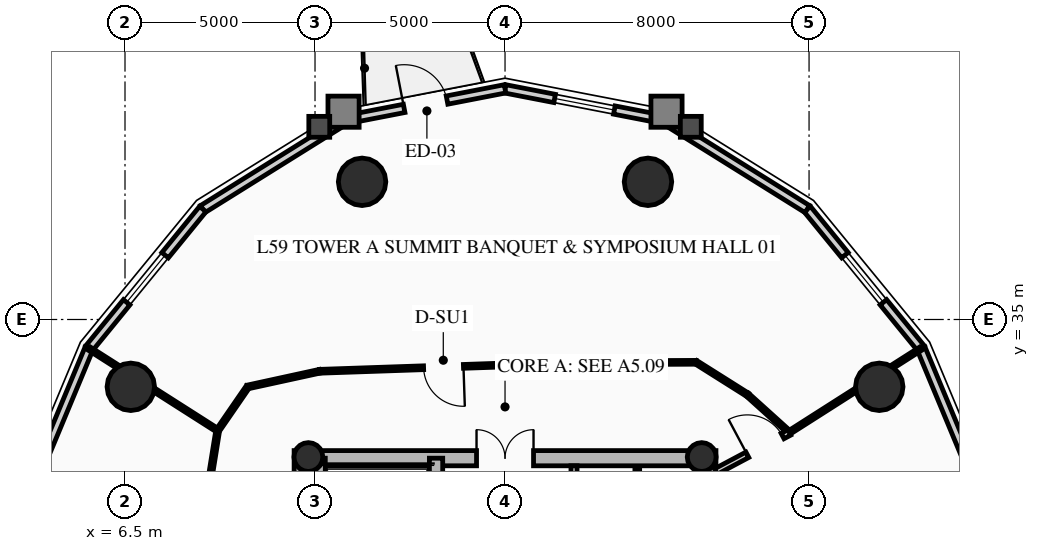
"""IFC4 building model, lengths in metres.
Left out: names, types, materials, properties, quantities, classifications, styles, units other than length and angle.
Written with IfcOpenShell. Run it as: python <this file> out.ifc"""

import sys

from ifc_helpers import new_model, si_unit, direction, frame, frame_2d, origin, origin_2d, place, context, subcontext, project, spatial, rectangle, circle, hollow_circle, extrude, source, transform, mapped, element, fill, save


model = new_model("IFC4")
c1 = context("Model", 3, precision=1e-05, world=origin(), true_north=direction((0.0, 1.0)))
c2 = subcontext(c1, "Body", "Model", "MODEL_VIEW")
j1 = project(units=[si_unit("LENGTHUNIT", "METRE"), si_unit("PLANEANGLEUNIT", "RADIAN")], contexts=[c1])
p1 = place(None, origin())
s1 = spatial("IfcSite", under=j1, at=p1, CompositionType="ELEMENT")
p2 = place(p1, origin())
s2 = spatial("IfcBuilding", under=s1, at=p2, CompositionType="ELEMENT")
p3 = place(p2, frame((0.0, 0.0, 186.52)))
s3 = spatial("IfcBuildingStorey", under=s2, at=p3, CompositionType="ELEMENT", Elevation=186.52)
for number, where, z_axis, x_axis in (
    (1, (11.15, 17.45, 0.0), (0.0, 0.0, 1.0), (0.0, 1.0, 0.0)),
    (2, (21.85, 17.45, 0.0), (0.0, 0.0, 1.0), (0.0, 1.0, 0.0)),
):
    element("IfcWall", number, at=place(p3, frame(where, z_axis=z_axis, x_axis=x_axis)), inside=s3, PredefinedType="SHEAR", context=c2, shape_type="SweptSolid", body=[
        extrude(rectangle(XDim=14.1, YDim=0.4, at=frame_2d((7.05, 0.0))), origin(), (0.0, 0.0, 1.0), 2.91),
    ])
p4 = place(p3, frame((11.15, 31.35, 0.0), z_axis=(0.0, 0.0, 1.0), x_axis=(1.0, 0.0, 0.0)))
e3 = element("IfcWall", 3, at=p4, inside=s3, PredefinedType="SHEAR", context=c2, shape_type="SweptSolid", body=[
    extrude(rectangle(XDim=10.7, YDim=0.4, at=frame_2d((5.35, 0.0))), origin(), (0.0, 0.0, 1.0), 2.91),
])
m1 = source(origin(), c2, "Body", "SweptSolid", [
    extrude(rectangle(XDim=1.5, YDim=2.02, at=frame_2d((0.75, 1.01))), frame((0.0, 0.21, 0.0), z_axis=(0.0, -1.0, 0.0), x_axis=(1.0, 0.0, 0.0)), (0.0, 0.0, 1.0), 0.42),
])
p5 = place(p4, frame((4.6, 0.0, 0.0)))
e4 = element("IfcOpeningElement", 4, at=p5, cuts=e3, PredefinedType="OPENING", context=c2, shape_type="MappedRepresentation", body=[
    mapped(m1, transform((0.0, 0.0, 0.0), x_axis=(1.0, 0.0, 0.0), y_axis=(0.0, 1.0, 0.0), z_axis=(0.0, 0.0, 1.0), scale=1.0)),
])
p6 = place(p3, frame((14.685, 17.65, 0.0), z_axis=(0.0, 0.0, 1.0), x_axis=(0.0, 1.0, 0.0)))
e5 = element("IfcWall", 5, at=p6, inside=s3, PredefinedType="SHEAR", context=c2, shape_type="SweptSolid", body=[
    extrude(rectangle(XDim=13.7, YDim=0.35, at=frame_2d((6.85, 0.0))), origin(), (0.0, 0.0, 1.0), 2.91),
])
m2 = source(origin(), c2, "Body", "SweptSolid", [
    extrude(rectangle(XDim=1.1, YDim=2.015, at=frame_2d((0.55, 1.007))), frame((0.0, 0.185, 0.0), z_axis=(0.0, -1.0, 0.0), x_axis=(1.0, 0.0, 0.0)), (0.0, 0.0, 1.0), 0.37),
])
p7 = place(p6, frame((4.85, 0.0, 0.0)))
e6 = element("IfcOpeningElement", 6, at=p7, cuts=e5, PredefinedType="OPENING", context=c2, shape_type="MappedRepresentation", body=[
    mapped(m2, transform((0.0, 0.0, 0.0), x_axis=(1.0, 0.0, 0.0), y_axis=(0.0, 1.0, 0.0), z_axis=(0.0, 0.0, 1.0), scale=1.0)),
])
p8 = place(p6, frame((0.625, 0.0, 0.0)))
e7 = element("IfcOpeningElement", 7, at=p8, cuts=e5, PredefinedType="OPENING", context=c2, shape_type="MappedRepresentation", body=[
    mapped(m2, transform((0.0, 0.0, 0.0), x_axis=(1.0, 0.0, 0.0), y_axis=(0.0, 1.0, 0.0), z_axis=(0.0, 0.0, 1.0), scale=1.0)),
])
p9 = place(p6, frame((2.625, 0.0, 0.0)))
e8 = element("IfcOpeningElement", 8, at=p9, cuts=e5, PredefinedType="OPENING", context=c2, shape_type="MappedRepresentation", body=[
    mapped(m2, transform((0.0, 0.0, 0.0), x_axis=(1.0, 0.0, 0.0), y_axis=(0.0, 1.0, 0.0), z_axis=(0.0, 0.0, 1.0), scale=1.0)),
])
m3 = source(origin(), c2, "Body", "SweptSolid", [
    extrude(rectangle(XDim=1.15, YDim=2.02, at=frame_2d((0.575, 1.01))), frame((0.0, 0.185, 0.0), z_axis=(0.0, -1.0, 0.0), x_axis=(1.0, 0.0, 0.0)), (0.0, 0.0, 1.0), 0.37),
])
p10 = place(p6, frame((7.27, 0.0, 0.0)))
e9 = element("IfcOpeningElement", 9, at=p10, cuts=e5, PredefinedType="OPENING", context=c2, shape_type="MappedRepresentation", body=[
    mapped(m3, transform((0.0, 0.0, 0.0), x_axis=(1.0, 0.0, 0.0), y_axis=(0.0, 1.0, 0.0), z_axis=(0.0, 0.0, 1.0), scale=1.0)),
])
p11 = place(p3, frame((11.595, 24.655, 0.0), z_axis=(0.0, 0.0, 1.0), x_axis=(0.0, 1.0, 0.0)))
e10 = element("IfcWall", 10, at=p11, inside=s3, PredefinedType="SHEAR", context=c2, shape_type="SweptSolid", body=[
    extrude(rectangle(XDim=6.695, YDim=0.35, at=frame_2d((3.348, 0.0))), origin(), (0.0, 0.0, 1.0), 2.91),
])
for number, where, z_axis, x_axis in (
    (11, (11.325, 31.38, 0.0), (0.0, 0.0, 1.0), (1.0, 0.0, 0.0)),
    (12, (21.675, 31.38, 0.0), (0.0, 0.0, 1.0), (1.0, 0.0, 0.0)),
):
    element("IfcColumn", number, at=place(p3, frame(where, z_axis=z_axis, x_axis=x_axis)), inside=s3, PredefinedType="COLUMN", context=c2, shape_type="SweptSolid", body=[
        extrude(hollow_circle(Radius=0.38, WallThickness=0.032, at=origin_2d()), origin(), (0.0, 0.0, 1.0), 2.91),
    ])
for number, where, z_axis, x_axis in (
    (13, (26.347, 33.229, 0.0), (0.0, 0.0, 1.0), (1.0, 0.0, 0.0)),
    (14, (20.261, 38.623, 0.0), (0.0, 0.0, 1.0), (1.0, 0.0, 0.0)),
    (15, (12.739, 38.623, 0.0), (0.0, 0.0, 1.0), (1.0, 0.0, 0.0)),
    (16, (6.653, 33.229, 0.0), (0.0, 0.0, 1.0), (1.0, 0.0, 0.0)),
):
    element("IfcColumn", number, at=place(p3, frame(where, z_axis=z_axis, x_axis=x_axis)), inside=s3, PredefinedType="USERDEFINED", context=c2, shape_type="SweptSolid", body=[
        extrude(circle(Radius=0.625, at=origin_2d()), origin(), (0.0, 0.0, 1.0), 2.91),
    ])
p12 = place(p3, frame((27.447, 34.24, 0.0), z_axis=(0.0, 0.0, 1.0), x_axis=(0.384144094086, -0.923273152961, 0.0)))
e17 = element("IfcWall", 17, at=p12, inside=s3, PredefinedType="SOLIDWALL", context=c2, shape_type="SweptSolid", body=[
    extrude(rectangle(XDim=5.003, YDim=0.22, at=frame_2d((2.501, 0.0))), origin(), (0.0, 0.0, 1.0), 2.245),
])
p13 = place(p3, frame((24.453, 37.906, 0.0), z_axis=(0.0, 0.0, 1.0), x_axis=(0.632470615287, -0.774584353572, 0.0)))
e18 = element("IfcWall", 18, at=p13, inside=s3, PredefinedType="SOLIDWALL", context=c2, shape_type="SweptSolid", body=[
    extrude(rectangle(XDim=4.733, YDim=0.22, at=frame_2d((2.366, 0.0))), origin(), (0.0, 0.0, 1.0), 2.245),
])
m4 = source(origin(), c2, "Body", "SweptSolid", [
    extrude(rectangle(XDim=1.6, YDim=1.3, at=frame_2d((0.8, 0.65))), frame((0.0, 0.12, 0.0), z_axis=(0.0, -1.0, 0.0), x_axis=(1.0, 0.0, 0.0)), (0.0, 0.0, 1.0), 0.24),
])
p14 = place(p13, frame((1.566, 0.0, 0.65)))
e19 = element("IfcOpeningElement", 19, at=p14, cuts=e18, PredefinedType="OPENING", context=c2, shape_type="MappedRepresentation", body=[
    mapped(m4, transform((0.0, 0.0, 0.0), x_axis=(1.0, 0.0, 0.0), y_axis=(0.0, 1.0, 0.0), z_axis=(0.0, 0.0, 1.0), scale=1.0)),
])
p15 = place(p3, frame((20.681, 40.259, 0.0), z_axis=(0.0, 0.0, 1.0), x_axis=(0.848399108042, -0.529357113368, 0.0)))
e20 = element("IfcWall", 20, at=p15, inside=s3, PredefinedType="SOLIDWALL", context=c2, shape_type="SweptSolid", body=[
    extrude(rectangle(XDim=4.446, YDim=0.22, at=frame_2d((2.223, 0.0))), origin(), (0.0, 0.0, 1.0), 2.245),
])
p16 = place(p3, frame((16.5, 41.07, 0.0), z_axis=(0.0, 0.0, 1.0), x_axis=(0.981703883443, -0.190413983815, 0.0)))
e21 = element("IfcWall", 21, at=p16, inside=s3, PredefinedType="SOLIDWALL", context=c2, shape_type="SweptSolid", body=[
    extrude(rectangle(XDim=4.259, YDim=0.22, at=frame_2d((2.13, 0.0))), origin(), (0.0, 0.0, 1.0), 2.245),
])
p17 = place(p16, frame((1.33, 0.0, 0.65)))
e22 = element("IfcOpeningElement", 22, at=p17, cuts=e21, PredefinedType="OPENING", context=c2, shape_type="MappedRepresentation", body=[
    mapped(m4, transform((0.0, 0.0, 0.0), x_axis=(1.0, 0.0, 0.0), y_axis=(0.0, 1.0, 0.0), z_axis=(0.0, 0.0, 1.0), scale=1.0)),
])
p18 = place(p3, frame((12.319, 40.259, 0.0), z_axis=(0.0, 0.0, 1.0), x_axis=(0.981703883443, 0.190413983815, 0.0)))
e23 = element("IfcWall", 23, at=p18, inside=s3, PredefinedType="SOLIDWALL", context=c2, shape_type="SweptSolid", body=[
    extrude(rectangle(XDim=4.259, YDim=0.22, at=frame_2d((2.13, 0.0))), origin(), (0.0, 0.0, 1.0), 2.245),
])
m5 = source(origin(), c2, "Body", "SweptSolid", [
    extrude(rectangle(XDim=1.15, YDim=2.005, at=frame_2d((0.575, 1.002))), frame((0.0, 0.12, 0.0), z_axis=(0.0, -1.0, 0.0), x_axis=(1.0, 0.0, 0.0)), (0.0, 0.0, 1.0), 0.24),
])
p19 = place(p18, frame((1.555, 0.0, 0.0)))
e24 = element("IfcOpeningElement", 24, at=p19, cuts=e23, PredefinedType="OPENING", context=c2, shape_type="MappedRepresentation", body=[
    mapped(m5, transform((0.0, 0.0, 0.0), x_axis=(1.0, 0.0, 0.0), y_axis=(0.0, 1.0, 0.0), z_axis=(0.0, 0.0, 1.0), scale=1.0)),
])
p20 = place(p3, frame((8.547, 37.906, 0.0), z_axis=(0.0, 0.0, 1.0), x_axis=(0.848399108042, 0.529357113368, 0.0)))
e25 = element("IfcWall", 25, at=p20, inside=s3, PredefinedType="SOLIDWALL", context=c2, shape_type="SweptSolid", body=[
    extrude(rectangle(XDim=4.446, YDim=0.22, at=frame_2d((2.223, 0.0))), origin(), (0.0, 0.0, 1.0), 2.245),
])
p21 = place(p3, frame((5.553, 34.24, 0.0), z_axis=(0.0, 0.0, 1.0), x_axis=(0.632470615287, 0.774584353572, 0.0)))
e26 = element("IfcWall", 26, at=p21, inside=s3, PredefinedType="SOLIDWALL", context=c2, shape_type="SweptSolid", body=[
    extrude(rectangle(XDim=4.733, YDim=0.22, at=frame_2d((2.366, 0.0))), origin(), (0.0, 0.0, 1.0), 2.245),
])
p22 = place(p21, frame((1.566, 0.0, 0.65)))
e27 = element("IfcOpeningElement", 27, at=p22, cuts=e26, PredefinedType="OPENING", context=c2, shape_type="MappedRepresentation", body=[
    mapped(m4, transform((0.0, 0.0, 0.0), x_axis=(1.0, 0.0, 0.0), y_axis=(0.0, 1.0, 0.0), z_axis=(0.0, 0.0, 1.0), scale=1.0)),
])
p23 = place(p3, frame((3.631, 29.62, 0.0), z_axis=(0.0, 0.0, 1.0), x_axis=(0.384144094086, 0.923273152961, 0.0)))
e28 = element("IfcWall", 28, at=p23, inside=s3, PredefinedType="SOLIDWALL", context=c2, shape_type="SweptSolid", body=[
    extrude(rectangle(XDim=5.003, YDim=0.22, at=frame_2d((2.501, 0.0))), origin(), (0.0, 0.0, 1.0), 2.245),
])
p24 = place(p3, frame((18.315, 27.25, 0.0), z_axis=(0.0, 0.0, 1.0), x_axis=(0.0, 1.0, 0.0)))
e29 = element("IfcWall", 29, at=p24, inside=s3, PredefinedType="PARTITIONING", context=c2, shape_type="SweptSolid", body=[
    extrude(rectangle(XDim=3.9, YDim=0.16, at=frame_2d((1.95, 0.0))), origin(), (0.0, 0.0, 1.0), 2.675),
])
m6 = source(origin(), c2, "Body", "SweptSolid", [
    extrude(rectangle(XDim=0.9, YDim=2.005, at=frame_2d((0.45, 1.002))), frame((0.0, 0.09, 0.0), z_axis=(0.0, -1.0, 0.0), x_axis=(1.0, 0.0, 0.0)), (0.0, 0.0, 1.0), 0.18),
])
p25 = place(p24, frame((2.2, 0.0, 0.0)))
e30 = element("IfcOpeningElement", 30, at=p25, cuts=e29, PredefinedType="OPENING", context=c2, shape_type="MappedRepresentation", body=[
    mapped(m6, transform((0.0, 0.0, 0.0), x_axis=(1.0, 0.0, 0.0), y_axis=(0.0, 1.0, 0.0), z_axis=(0.0, 0.0, 1.0), scale=1.0)),
])
p26 = place(p3, frame((19.98, 27.3, 0.0), z_axis=(0.0, 0.0, 1.0), x_axis=(0.0, 1.0, 0.0)))
e31 = element("IfcWall", 31, at=p26, inside=s3, PredefinedType="PARTITIONING", context=c2, shape_type="SweptSolid", body=[
    extrude(rectangle(XDim=3.82, YDim=0.125, at=frame_2d((1.91, 0.0))), origin(), (0.0, 0.0, 1.0), 2.675),
])
m7 = source(origin(), c2, "Body", "SweptSolid", [
    extrude(rectangle(XDim=0.9, YDim=2.005, at=frame_2d((0.45, 1.002))), frame((0.0, 0.073, 0.0), z_axis=(0.0, -1.0, 0.0), x_axis=(1.0, 0.0, 0.0)), (0.0, 0.0, 1.0), 0.145),
])
p27 = place(p26, frame((1.45, 0.0, 0.0)))
e32 = element("IfcOpeningElement", 32, at=p27, cuts=e31, PredefinedType="OPENING", context=c2, shape_type="MappedRepresentation", body=[
    mapped(m7, transform((0.0, 0.0, 0.0), x_axis=(1.0, 0.0, 0.0), y_axis=(0.0, 1.0, 0.0), z_axis=(0.0, 0.0, 1.0), scale=1.0)),
])
p28 = place(p3, frame((23.98, 32.027, 0.0), z_axis=(0.0, 0.0, 1.0), x_axis=(-0.742353224332, 0.670008724065, 0.0)))
e33 = element("IfcWall", 33, at=p28, inside=s3, PredefinedType="MOVABLE", context=c2, shape_type="SweptSolid", body=[
    extrude(rectangle(XDim=1.485, YDim=0.1, at=frame_2d((0.742, 0.0))), origin(), (0.0, 0.0, 1.0), 2.245),
])
p29 = place(p3, frame((22.877, 33.022, 0.0), z_axis=(0.0, 0.0, 1.0), x_axis=(-0.845895608855, 0.533348496689, 0.0)))
e34 = element("IfcWall", 34, at=p29, inside=s3, PredefinedType="MOVABLE", context=c2, shape_type="SweptSolid", body=[
    extrude(rectangle(XDim=1.597, YDim=0.1, at=frame_2d((0.798, 0.0))), origin(), (0.0, 0.0, 1.0), 2.245),
])
p30 = place(p3, frame((21.527, 33.873, 0.0), z_axis=(0.0, 0.0, 1.0), x_axis=(-0.999991838845, -0.004040079574, 0.0)))
e35 = element("IfcWall", 35, at=p30, inside=s3, PredefinedType="MOVABLE", context=c2, shape_type="SweptSolid", body=[
    extrude(rectangle(XDim=3.384, YDim=0.1, at=frame_2d((1.692, 0.0))), origin(), (0.0, 0.0, 1.0), 2.245),
])
p31 = place(p3, frame((18.143, 33.86, 0.0), z_axis=(0.0, 0.0, 1.0), x_axis=(-0.999419208319, -0.034077060363, 0.0)))
e36 = element("IfcWall", 36, at=p31, inside=s3, PredefinedType="MOVABLE", context=c2, shape_type="SweptSolid", body=[
    extrude(rectangle(XDim=6.527, YDim=0.1, at=frame_2d((3.263, 0.0))), origin(), (0.0, 0.0, 1.0), 2.245),
])
m8 = source(origin(), c2, "Body", "SweptSolid", [
    extrude(rectangle(XDim=1.05, YDim=2.015, at=frame_2d((0.525, 1.007))), frame((0.0, 0.06, 0.0), z_axis=(0.0, -1.0, 0.0), x_axis=(1.0, 0.0, 0.0)), (0.0, 0.0, 1.0), 0.12),
])
p32 = place(p31, frame((2.738, 0.0, 0.0)))
e37 = element("IfcOpeningElement", 37, at=p32, cuts=e36, PredefinedType="OPENING", context=c2, shape_type="MappedRepresentation", body=[
    mapped(m8, transform((0.0, 0.0, 0.0), x_axis=(1.0, 0.0, 0.0), y_axis=(0.0, 1.0, 0.0), z_axis=(0.0, 0.0, 1.0), scale=1.0)),
])
p33 = place(p3, frame((11.62, 33.637, 0.0), z_axis=(0.0, 0.0, 1.0), x_axis=(-0.97702579435, -0.213121085711, 0.0)))
e38 = element("IfcWall", 38, at=p33, inside=s3, PredefinedType="MOVABLE", context=c2, shape_type="SweptSolid", body=[
    extrude(rectangle(XDim=1.935, YDim=0.1, at=frame_2d((0.967, 0.0))), origin(), (0.0, 0.0, 1.0), 2.245),
])
p34 = place(p3, frame((9.729, 33.225, 0.0), z_axis=(0.0, 0.0, 1.0), x_axis=(-0.567183649484, -0.82359134755, 0.0)))
e39 = element("IfcWall", 39, at=p34, inside=s3, PredefinedType="MOVABLE", context=c2, shape_type="SweptSolid", body=[
    extrude(rectangle(XDim=1.392, YDim=0.1, at=frame_2d((0.696, 0.0))), origin(), (0.0, 0.0, 1.0), 2.245),
])
p35 = place(p3, frame((8.94, 32.078, 0.0), z_axis=(0.0, 0.0, 1.0), x_axis=(-0.159148467753, -0.98725466077, 0.0)))
e40 = element("IfcWall", 40, at=p35, inside=s3, PredefinedType="MOVABLE", context=c2, shape_type="SweptSolid", body=[
    extrude(rectangle(XDim=1.554, YDim=0.1, at=frame_2d((0.777, 0.0))), origin(), (0.0, 0.0, 1.0), 2.245),
])
p36 = place(p3, frame((23.98, 32.027, 0.0), z_axis=(0.0, 0.0, 1.0), x_axis=(0.843120722145, 0.53772432332, 0.0)))
e41 = element("IfcWall", 41, at=p36, inside=s3, PredefinedType="MOVABLE", context=c2, shape_type="SweptSolid", body=[
    extrude(rectangle(XDim=4.093, YDim=0.1, at=frame_2d((2.046, 0.0))), origin(), (0.0, 0.0, 1.0), 2.245),
])
p37 = place(p3, frame((8.94, 32.078, 0.0), z_axis=(0.0, 0.0, 1.0), x_axis=(-0.843153138911, 0.53767349232, 0.0)))
e42 = element("IfcWall", 42, at=p37, inside=s3, PredefinedType="MOVABLE", context=c2, shape_type="SweptSolid", body=[
    extrude(rectangle(XDim=3.998, YDim=0.1, at=frame_2d((1.999, 0.0))), origin(), (0.0, 0.0, 1.0), 2.245),
])
p38 = place(p3, frame((22.05, 31.0, 0.0), z_axis=(0.0, 0.0, 1.0), x_axis=(0.882791584709, 0.469764853908, 0.0)))
e43 = element("IfcWall", 43, at=p38, inside=s3, PredefinedType="PARTITIONING", context=c2, shape_type="SweptSolid", body=[
    extrude(rectangle(XDim=2.186, YDim=0.16, at=frame_2d((1.093, 0.0))), origin(), (0.0, 0.0, 1.0), 2.245),
])
m9 = source(origin(), c2, "Body", "SweptSolid", [
    extrude(rectangle(XDim=1.05, YDim=2.015, at=frame_2d((0.525, 1.007))), frame((0.0, 0.09, 0.0), z_axis=(0.0, -1.0, 0.0), x_axis=(1.0, 0.0, 0.0)), (0.0, 0.0, 1.0), 0.18),
])
p39 = place(p38, frame((0.936, 0.0, 0.0)))
e44 = element("IfcOpeningElement", 44, at=p39, cuts=e43, PredefinedType="OPENING", context=c2, shape_type="MappedRepresentation", body=[
    mapped(m9, transform((0.0, 0.0, 0.0), x_axis=(1.0, 0.0, 0.0), y_axis=(0.0, 1.0, 0.0), z_axis=(0.0, 0.0, 1.0), scale=1.0)),
])
m10 = source(origin(), c2, "Body", "SweptSolid", [
    extrude(rectangle(XDim=1.6, YDim=1.3, at=frame_2d((0.8, 0.65))), frame((0.0, 0.03, 0.0), z_axis=(0.0, -1.0, 0.0), x_axis=(1.0, 0.0, 0.0)), (0.0, 0.0, 1.0), 0.06),
])
p40 = place(p14, origin())
e45 = element("IfcWindow", 45, at=p40, inside=s3, PartitioningType="SINGLE_PANEL", PredefinedType="WINDOW", context=c2, shape_type="MappedRepresentation", body=[
    mapped(m10, transform((0.0, 0.0, 0.0), x_axis=(1.0, 0.0, 0.0), y_axis=(0.0, 1.0, 0.0), z_axis=(0.0, 0.0, 1.0), scale=1.0)),
])
fill(e19, e45)
p41 = place(p17, origin())
e46 = element("IfcWindow", 46, at=p41, inside=s3, PartitioningType="SINGLE_PANEL", PredefinedType="WINDOW", context=c2, shape_type="MappedRepresentation", body=[
    mapped(m10, transform((0.0, 0.0, 0.0), x_axis=(1.0, 0.0, 0.0), y_axis=(0.0, 1.0, 0.0), z_axis=(0.0, 0.0, 1.0), scale=1.0)),
])
fill(e22, e46)
m11 = source(origin(), c2, "Body", "SweptSolid", [
    extrude(rectangle(XDim=1.15, YDim=2.005, at=frame_2d((0.575, 1.002))), frame((0.0, 0.025, 0.0), z_axis=(0.0, -1.0, 0.0), x_axis=(1.0, 0.0, 0.0)), (0.0, 0.0, 1.0), 0.05),
])
p42 = place(p19, origin())
e47 = element("IfcDoor", 47, at=p42, inside=s3, OperationType="SINGLE_SWING_LEFT", PredefinedType="DOOR", context=c2, shape_type="MappedRepresentation", body=[
    mapped(m11, transform((0.0, 0.0, 0.0), x_axis=(1.0, 0.0, 0.0), y_axis=(0.0, 1.0, 0.0), z_axis=(0.0, 0.0, 1.0), scale=1.0)),
])
fill(e24, e47)
p43 = place(p22, origin())
e48 = element("IfcWindow", 48, at=p43, inside=s3, PartitioningType="SINGLE_PANEL", PredefinedType="WINDOW", context=c2, shape_type="MappedRepresentation", body=[
    mapped(m10, transform((0.0, 0.0, 0.0), x_axis=(1.0, 0.0, 0.0), y_axis=(0.0, 1.0, 0.0), z_axis=(0.0, 0.0, 1.0), scale=1.0)),
])
fill(e27, e48)
m12 = source(origin(), c2, "Body", "SweptSolid", [
    extrude(rectangle(XDim=1.5, YDim=2.02, at=frame_2d((0.75, 1.01))), frame((0.0, 0.025, 0.0), z_axis=(0.0, -1.0, 0.0), x_axis=(1.0, 0.0, 0.0)), (0.0, 0.0, 1.0), 0.05),
])
p44 = place(p5, origin())
e49 = element("IfcDoor", 49, at=p44, inside=s3, OperationType="DOUBLE_DOOR_SINGLE_SWING", PredefinedType="DOOR", context=c2, shape_type="MappedRepresentation", body=[
    mapped(m12, transform((0.0, 0.0, 0.0), x_axis=(1.0, 0.0, 0.0), y_axis=(0.0, 1.0, 0.0), z_axis=(0.0, 0.0, 1.0), scale=1.0)),
])
fill(e4, e49)
m13 = source(origin(), c2, "Body", "SweptSolid", [
    extrude(rectangle(XDim=1.05, YDim=2.015, at=frame_2d((0.525, 1.007))), frame((0.0, 0.025, 0.0), z_axis=(0.0, -1.0, 0.0), x_axis=(1.0, 0.0, 0.0)), (0.0, 0.0, 1.0), 0.05),
])
p45 = place(p39, origin())
e50 = element("IfcDoor", 50, at=p45, inside=s3, OperationType="SINGLE_SWING_LEFT", PredefinedType="DOOR", context=c2, shape_type="MappedRepresentation", body=[
    mapped(m13, transform((0.0, 0.0, 0.0), x_axis=(1.0, 0.0, 0.0), y_axis=(0.0, 1.0, 0.0), z_axis=(0.0, 0.0, 1.0), scale=1.0)),
])
fill(e44, e50)
p46 = place(p32, origin())
e51 = element("IfcDoor", 51, at=p46, inside=s3, OperationType="SINGLE_SWING_LEFT", PredefinedType="DOOR", context=c2, shape_type="MappedRepresentation", body=[
    mapped(m13, transform((0.0, 0.0, 0.0), x_axis=(1.0, 0.0, 0.0), y_axis=(0.0, 1.0, 0.0), z_axis=(0.0, 0.0, 1.0), scale=1.0)),
])
fill(e37, e51)
save(model, sys.argv[1])
